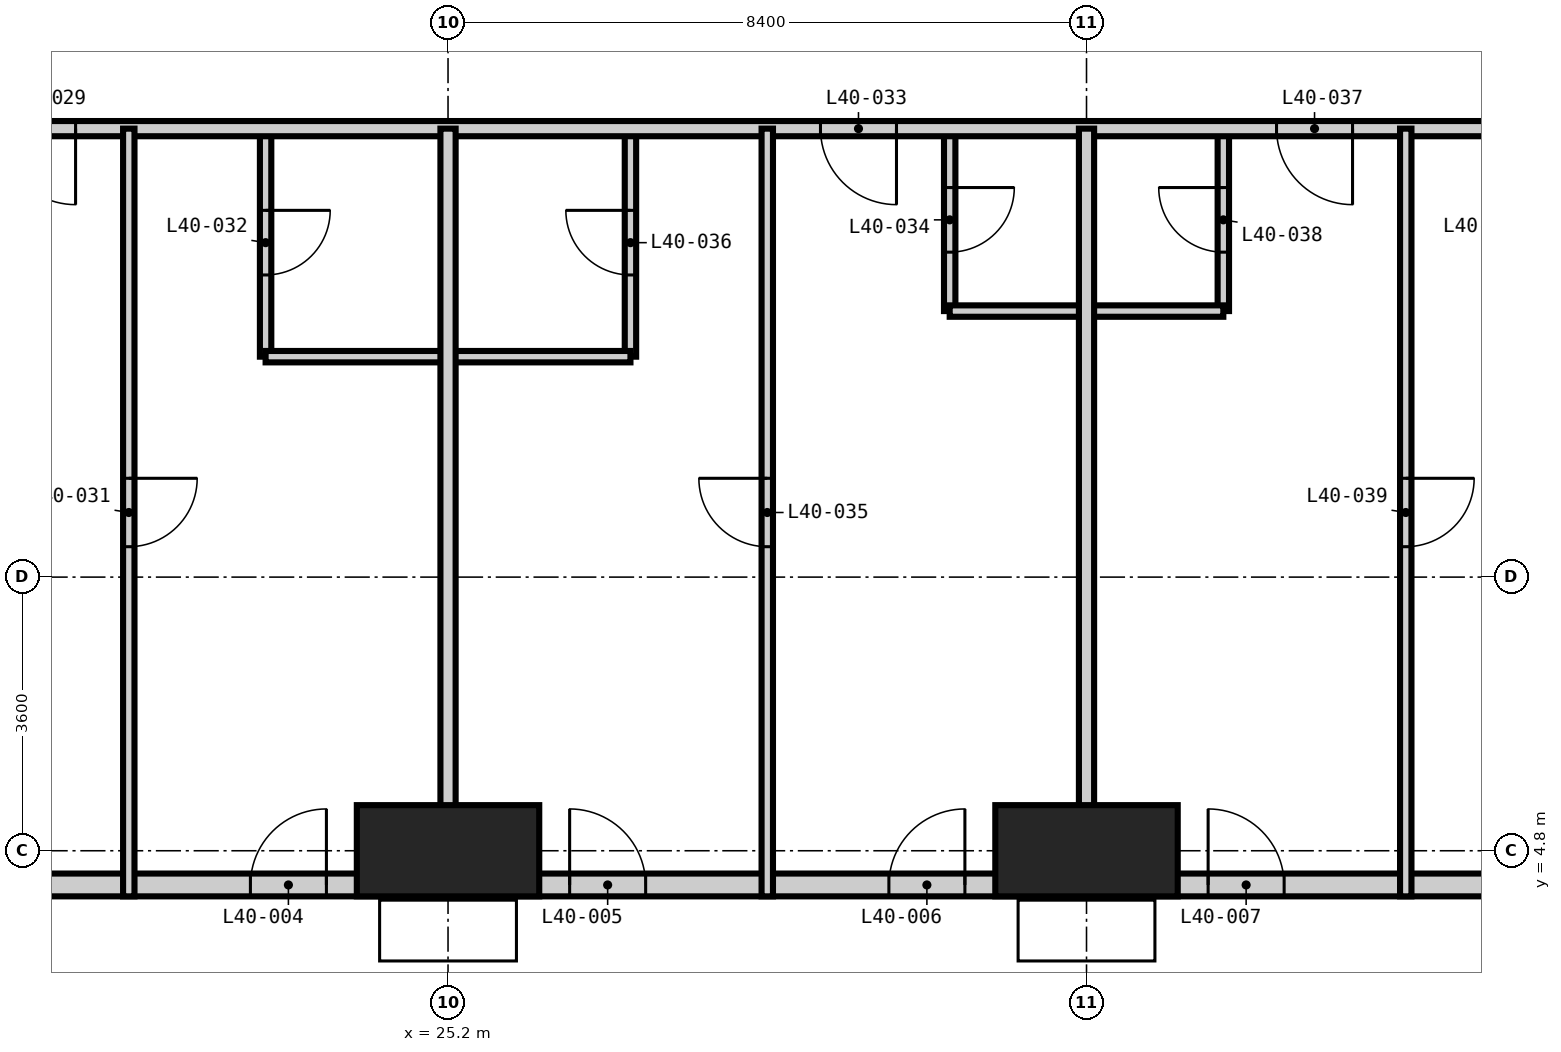
"""IFC4 building model, lengths in metres.
Left out: names, types, materials, properties, quantities, classifications, styles, units other than length and angle.
Written with IfcOpenShell. Run it as: python <this file> out.ifc"""

import sys

from ifc_helpers import new_model, si_unit, direction, frame, frame_2d, origin, origin_2d, place, context, subcontext, project, spatial, rectangle, extrude, element, fill, save


model = new_model("IFC4")
c1 = context("Model", 3, precision=1e-05, world=origin(), true_north=direction((0.0, 1.0)))
c2 = subcontext(c1, "Body", "Model", "MODEL_VIEW")
j1 = project(units=[si_unit("LENGTHUNIT", "METRE"), si_unit("PLANEANGLEUNIT", "RADIAN")], contexts=[c1])
p1 = place(None, origin())
s1 = spatial("IfcSite", under=j1, at=p1, CompositionType="ELEMENT")
p2 = place(p1, origin())
s2 = spatial("IfcBuilding", under=s1, at=p2, CompositionType="ELEMENT")
p3 = place(p2, frame((0.0, 0.0, 159.0)))
s3 = spatial("IfcBuildingStorey", under=s2, at=p3, CompositionType="ELEMENT", Elevation=159.0)
for number, where, z_axis, x_axis in (
    (1, (25.2, 4.8, -0.35), (0.0, 0.0, 1.0), (1.0, 0.0, 0.0)),
    (2, (33.6, 4.8, -0.35), (0.0, 0.0, 1.0), (1.0, 0.0, 0.0)),
):
    element("IfcColumn", number, at=place(p3, frame(where, z_axis=z_axis, x_axis=x_axis)), inside=s3, PredefinedType="COLUMN", context=c2, shape_type="SweptSolid", body=[
        extrude(rectangle(XDim=2.4, YDim=1.2, at=origin_2d()), origin(), (0.0, 0.0, 1.0), 3.6),
    ])
p4 = place(p3, frame((6.9, 4.35, 0.0), z_axis=(0.0, 0.0, 1.0), x_axis=(1.0, 0.0, 0.0)))
e3 = element("IfcWall", 3, at=p4, inside=s3, PredefinedType="SOLIDWALL", context=c2, shape_type="SweptSolid", body=[
    extrude(rectangle(XDim=45.0, YDim=0.3, at=frame_2d((22.5, 0.0))), origin(), (0.0, 0.0, 1.0), 3.25),
])
p5 = place(p4, frame((2.75, 0.0, 0.0)))
e4 = element("IfcOpeningElement", 4, at=p5, cuts=e3, PredefinedType="OPENING", context=c2, shape_type="SweptSolid", body=[
    extrude(rectangle(XDim=1.0, YDim=2.4, at=frame_2d((0.5, 1.2))), frame((0.0, 0.16, 0.0), z_axis=(0.0, -1.0, 0.0), x_axis=(1.0, 0.0, 0.0)), (0.0, 0.0, 1.0), 0.32),
])
p6 = place(p4, frame((7.3, 0.0, 0.0)))
e5 = element("IfcOpeningElement", 5, at=p6, cuts=e3, PredefinedType="OPENING", context=c2, shape_type="SweptSolid", body=[
    extrude(rectangle(XDim=1.0, YDim=2.4, at=frame_2d((0.5, 1.2))), frame((0.0, 0.16, 0.0), z_axis=(0.0, -1.0, 0.0), x_axis=(1.0, 0.0, 0.0)), (0.0, 0.0, 1.0), 0.32),
])
p7 = place(p4, frame((11.5, 0.0, 0.0)))
e6 = element("IfcOpeningElement", 6, at=p7, cuts=e3, PredefinedType="OPENING", context=c2, shape_type="SweptSolid", body=[
    extrude(rectangle(XDim=1.0, YDim=2.4, at=frame_2d((0.5, 1.2))), frame((0.0, 0.16, 0.0), z_axis=(0.0, -1.0, 0.0), x_axis=(1.0, 0.0, 0.0)), (0.0, 0.0, 1.0), 0.32),
])
p8 = place(p4, frame((15.7, 0.0, 0.0)))
e7 = element("IfcOpeningElement", 7, at=p8, cuts=e3, PredefinedType="OPENING", context=c2, shape_type="SweptSolid", body=[
    extrude(rectangle(XDim=1.0, YDim=2.4, at=frame_2d((0.5, 1.2))), frame((0.0, 0.16, 0.0), z_axis=(0.0, -1.0, 0.0), x_axis=(1.0, 0.0, 0.0)), (0.0, 0.0, 1.0), 0.32),
])
p9 = place(p4, frame((19.9, 0.0, 0.0)))
e8 = element("IfcOpeningElement", 8, at=p9, cuts=e3, PredefinedType="OPENING", context=c2, shape_type="SweptSolid", body=[
    extrude(rectangle(XDim=1.0, YDim=2.4, at=frame_2d((0.5, 1.2))), frame((0.0, 0.16, 0.0), z_axis=(0.0, -1.0, 0.0), x_axis=(1.0, 0.0, 0.0)), (0.0, 0.0, 1.0), 0.32),
])
p10 = place(p4, frame((24.1, 0.0, 0.0)))
e9 = element("IfcOpeningElement", 9, at=p10, cuts=e3, PredefinedType="OPENING", context=c2, shape_type="SweptSolid", body=[
    extrude(rectangle(XDim=1.0, YDim=2.4, at=frame_2d((0.5, 1.2))), frame((0.0, 0.16, 0.0), z_axis=(0.0, -1.0, 0.0), x_axis=(1.0, 0.0, 0.0)), (0.0, 0.0, 1.0), 0.32),
])
p11 = place(p4, frame((28.3, 0.0, 0.0)))
e10 = element("IfcOpeningElement", 10, at=p11, cuts=e3, PredefinedType="OPENING", context=c2, shape_type="SweptSolid", body=[
    extrude(rectangle(XDim=1.0, YDim=2.4, at=frame_2d((0.5, 1.2))), frame((0.0, 0.16, 0.0), z_axis=(0.0, -1.0, 0.0), x_axis=(1.0, 0.0, 0.0)), (0.0, 0.0, 1.0), 0.32),
])
p12 = place(p4, frame((32.5, 0.0, 0.0)))
e11 = element("IfcOpeningElement", 11, at=p12, cuts=e3, PredefinedType="OPENING", context=c2, shape_type="SweptSolid", body=[
    extrude(rectangle(XDim=1.0, YDim=2.4, at=frame_2d((0.5, 1.2))), frame((0.0, 0.16, 0.0), z_axis=(0.0, -1.0, 0.0), x_axis=(1.0, 0.0, 0.0)), (0.0, 0.0, 1.0), 0.32),
])
p13 = place(p4, frame((36.7, 0.0, 0.0)))
e12 = element("IfcOpeningElement", 12, at=p13, cuts=e3, PredefinedType="OPENING", context=c2, shape_type="SweptSolid", body=[
    extrude(rectangle(XDim=1.0, YDim=2.4, at=frame_2d((0.5, 1.2))), frame((0.0, 0.16, 0.0), z_axis=(0.0, -1.0, 0.0), x_axis=(1.0, 0.0, 0.0)), (0.0, 0.0, 1.0), 0.32),
])
p14 = place(p4, frame((41.25, 0.0, 0.0)))
e13 = element("IfcOpeningElement", 13, at=p14, cuts=e3, PredefinedType="OPENING", context=c2, shape_type="SweptSolid", body=[
    extrude(rectangle(XDim=1.0, YDim=2.4, at=frame_2d((0.5, 1.2))), frame((0.0, 0.16, 0.0), z_axis=(0.0, -1.0, 0.0), x_axis=(1.0, 0.0, 0.0)), (0.0, 0.0, 1.0), 0.32),
])
p15 = place(p3, frame((22.8, 11.3, 0.0), z_axis=(0.0, 0.0, 1.0), x_axis=(0.0, 1.0, 0.0)))
e14 = element("IfcWall", 14, at=p15, inside=s3, PredefinedType="PARTITIONING", context=c2, shape_type="SweptSolid", body=[
    extrude(rectangle(XDim=3.0, YDim=0.15, at=frame_2d((1.5, 0.0))), origin(), (0.0, 0.0, 1.0), 3.25),
])
p16 = place(p15, frame((1.075, 0.0, 0.0)))
e15 = element("IfcOpeningElement", 15, at=p16, cuts=e14, PredefinedType="OPENING", context=c2, shape_type="SweptSolid", body=[
    extrude(rectangle(XDim=0.85, YDim=2.1, at=frame_2d((0.425, 1.05))), frame((0.0, 0.085, 0.0), z_axis=(0.0, -1.0, 0.0), x_axis=(1.0, 0.0, 0.0)), (0.0, 0.0, 1.0), 0.17),
])
p17 = place(p3, frame((27.6, 11.3, 0.0), z_axis=(0.0, 0.0, 1.0), x_axis=(0.0, 1.0, 0.0)))
e16 = element("IfcWall", 16, at=p17, inside=s3, PredefinedType="PARTITIONING", context=c2, shape_type="SweptSolid", body=[
    extrude(rectangle(XDim=3.0, YDim=0.15, at=frame_2d((1.5, 0.0))), origin(), (0.0, 0.0, 1.0), 3.25),
])
p18 = place(p17, frame((1.075, 0.0, 0.0)))
e17 = element("IfcOpeningElement", 17, at=p18, cuts=e16, PredefinedType="OPENING", context=c2, shape_type="SweptSolid", body=[
    extrude(rectangle(XDim=0.85, YDim=2.1, at=frame_2d((0.425, 1.05))), frame((0.0, 0.085, 0.0), z_axis=(0.0, -1.0, 0.0), x_axis=(1.0, 0.0, 0.0)), (0.0, 0.0, 1.0), 0.17),
])
p19 = place(p3, frame((31.8, 11.9, 0.0), z_axis=(0.0, 0.0, 1.0), x_axis=(0.0, 1.0, 0.0)))
e18 = element("IfcWall", 18, at=p19, inside=s3, PredefinedType="PARTITIONING", context=c2, shape_type="SweptSolid", body=[
    extrude(rectangle(XDim=2.4, YDim=0.15, at=frame_2d((1.2, 0.0))), origin(), (0.0, 0.0, 1.0), 3.25),
])
p20 = place(p19, frame((0.775, 0.0, 0.0)))
e19 = element("IfcOpeningElement", 19, at=p20, cuts=e18, PredefinedType="OPENING", context=c2, shape_type="SweptSolid", body=[
    extrude(rectangle(XDim=0.85, YDim=2.1, at=frame_2d((0.425, 1.05))), frame((0.0, 0.085, 0.0), z_axis=(0.0, -1.0, 0.0), x_axis=(1.0, 0.0, 0.0)), (0.0, 0.0, 1.0), 0.17),
])
p21 = place(p3, frame((35.4, 11.9, 0.0), z_axis=(0.0, 0.0, 1.0), x_axis=(0.0, 1.0, 0.0)))
e20 = element("IfcWall", 20, at=p21, inside=s3, PredefinedType="PARTITIONING", context=c2, shape_type="SweptSolid", body=[
    extrude(rectangle(XDim=2.4, YDim=0.15, at=frame_2d((1.2, 0.0))), origin(), (0.0, 0.0, 1.0), 3.25),
])
p22 = place(p21, frame((0.775, 0.0, 0.0)))
e21 = element("IfcOpeningElement", 21, at=p22, cuts=e20, PredefinedType="OPENING", context=c2, shape_type="SweptSolid", body=[
    extrude(rectangle(XDim=0.85, YDim=2.1, at=frame_2d((0.425, 1.05))), frame((0.0, 0.085, 0.0), z_axis=(0.0, -1.0, 0.0), x_axis=(1.0, 0.0, 0.0)), (0.0, 0.0, 1.0), 0.17),
])
p23 = place(p3, frame((22.8, 11.3, 0.0), z_axis=(0.0, 0.0, 1.0), x_axis=(1.0, 0.0, 0.0)))
e22 = element("IfcWall", 22, at=p23, inside=s3, PredefinedType="PARTITIONING", context=c2, shape_type="SweptSolid", body=[
    extrude(rectangle(XDim=4.8, YDim=0.15, at=frame_2d((2.4, 0.0))), origin(), (0.0, 0.0, 1.0), 3.25),
])
p24 = place(p3, frame((31.8, 11.9, 0.0), z_axis=(0.0, 0.0, 1.0), x_axis=(1.0, 0.0, 0.0)))
e23 = element("IfcWall", 23, at=p24, inside=s3, PredefinedType="PARTITIONING", context=c2, shape_type="SweptSolid", body=[
    extrude(rectangle(XDim=3.6, YDim=0.15, at=frame_2d((1.8, 0.0))), origin(), (0.0, 0.0, 1.0), 3.25),
])
p25 = place(p3, frame((45.1, 14.3, 0.0), z_axis=(0.0, 0.0, 1.0), x_axis=(-1.0, 0.0, 0.0)))
e24 = element("IfcWall", 24, at=p25, inside=s3, PredefinedType="PARTITIONING", context=c2, shape_type="SweptSolid", body=[
    extrude(rectangle(XDim=30.8, YDim=0.2, at=frame_2d((15.4, 0.0))), origin(), (0.0, 0.0, 1.0), 3.25),
])
p26 = place(p25, frame((24.8, 0.0, 0.0)))
e25 = element("IfcOpeningElement", 25, at=p26, cuts=e24, PredefinedType="OPENING", context=c2, shape_type="SweptSolid", body=[
    extrude(rectangle(XDim=1.0, YDim=2.2, at=frame_2d((0.5, 1.1))), frame((0.0, 0.11, 0.0), z_axis=(0.0, -1.0, 0.0), x_axis=(1.0, 0.0, 0.0)), (0.0, 0.0, 1.0), 0.22),
])
p27 = place(p25, frame((14.0, 0.0, 0.0)))
e26 = element("IfcOpeningElement", 26, at=p27, cuts=e24, PredefinedType="OPENING", context=c2, shape_type="SweptSolid", body=[
    extrude(rectangle(XDim=1.0, YDim=2.2, at=frame_2d((0.5, 1.1))), frame((0.0, 0.11, 0.0), z_axis=(0.0, -1.0, 0.0), x_axis=(1.0, 0.0, 0.0)), (0.0, 0.0, 1.0), 0.22),
])
p28 = place(p25, frame((8.0, 0.0, 0.0)))
e27 = element("IfcOpeningElement", 27, at=p28, cuts=e24, PredefinedType="OPENING", context=c2, shape_type="SweptSolid", body=[
    extrude(rectangle(XDim=1.0, YDim=2.2, at=frame_2d((0.5, 1.1))), frame((0.0, 0.11, 0.0), z_axis=(0.0, -1.0, 0.0), x_axis=(1.0, 0.0, 0.0)), (0.0, 0.0, 1.0), 0.22),
])
for number, where, z_axis, x_axis in (
    (28, (25.2, 4.2, 0.0), (0.0, 0.0, 1.0), (0.0, 1.0, 0.0)),
    (29, (33.6, 4.2, 0.0), (0.0, 0.0, 1.0), (0.0, 1.0, 0.0)),
):
    element("IfcWall", number, at=place(p3, frame(where, z_axis=z_axis, x_axis=x_axis)), inside=s3, PredefinedType="PARTITIONING", context=c2, shape_type="SweptSolid", body=[
        extrude(rectangle(XDim=10.1, YDim=0.2, at=frame_2d((5.05, 0.0))), origin(), (0.0, 0.0, 1.0), 3.25),
    ])
p29 = place(p3, frame((21.0, 4.2, 0.0), z_axis=(0.0, 0.0, 1.0), x_axis=(0.0, 1.0, 0.0)))
e30 = element("IfcWall", 30, at=p29, inside=s3, PredefinedType="PARTITIONING", context=c2, shape_type="SweptSolid", body=[
    extrude(rectangle(XDim=10.1, YDim=0.15, at=frame_2d((5.05, 0.0))), origin(), (0.0, 0.0, 1.0), 3.25),
])
p30 = place(p29, frame((4.6, 0.0, 0.0)))
e31 = element("IfcOpeningElement", 31, at=p30, cuts=e30, PredefinedType="OPENING", context=c2, shape_type="SweptSolid", body=[
    extrude(rectangle(XDim=0.9, YDim=2.1, at=frame_2d((0.45, 1.05))), frame((0.0, 0.085, 0.0), z_axis=(0.0, -1.0, 0.0), x_axis=(1.0, 0.0, 0.0)), (0.0, 0.0, 1.0), 0.17),
])
p31 = place(p3, frame((29.4, 4.2, 0.0), z_axis=(0.0, 0.0, 1.0), x_axis=(0.0, 1.0, 0.0)))
e32 = element("IfcWall", 32, at=p31, inside=s3, PredefinedType="PARTITIONING", context=c2, shape_type="SweptSolid", body=[
    extrude(rectangle(XDim=10.1, YDim=0.15, at=frame_2d((5.05, 0.0))), origin(), (0.0, 0.0, 1.0), 3.25),
])
p32 = place(p31, frame((4.6, 0.0, 0.0)))
e33 = element("IfcOpeningElement", 33, at=p32, cuts=e32, PredefinedType="OPENING", context=c2, shape_type="SweptSolid", body=[
    extrude(rectangle(XDim=0.9, YDim=2.1, at=frame_2d((0.45, 1.05))), frame((0.0, 0.085, 0.0), z_axis=(0.0, -1.0, 0.0), x_axis=(1.0, 0.0, 0.0)), (0.0, 0.0, 1.0), 0.17),
])
p33 = place(p3, frame((37.8, 4.2, 0.0), z_axis=(0.0, 0.0, 1.0), x_axis=(0.0, 1.0, 0.0)))
e34 = element("IfcWall", 34, at=p33, inside=s3, PredefinedType="PARTITIONING", context=c2, shape_type="SweptSolid", body=[
    extrude(rectangle(XDim=10.1, YDim=0.15, at=frame_2d((5.05, 0.0))), origin(), (0.0, 0.0, 1.0), 3.25),
])
p34 = place(p33, frame((4.6, 0.0, 0.0)))
e35 = element("IfcOpeningElement", 35, at=p34, cuts=e34, PredefinedType="OPENING", context=c2, shape_type="SweptSolid", body=[
    extrude(rectangle(XDim=0.9, YDim=2.1, at=frame_2d((0.45, 1.05))), frame((0.0, 0.085, 0.0), z_axis=(0.0, -1.0, 0.0), x_axis=(1.0, 0.0, 0.0)), (0.0, 0.0, 1.0), 0.17),
])
p35 = place(p8, origin())
e36 = element("IfcDoor", 36, at=p35, inside=s3, OperationType="SINGLE_SWING_RIGHT", PredefinedType="DOOR", context=c2, shape_type="SweptSolid", body=[
    extrude(rectangle(XDim=1.0, YDim=2.4, at=frame_2d((0.5, 1.2))), frame((0.0, 0.025, 0.0), z_axis=(0.0, -1.0, 0.0), x_axis=(1.0, 0.0, 0.0)), (0.0, 0.0, 1.0), 0.05),
])
fill(e7, e36)
p36 = place(p9, origin())
e37 = element("IfcDoor", 37, at=p36, inside=s3, OperationType="SINGLE_SWING_LEFT", PredefinedType="DOOR", context=c2, shape_type="SweptSolid", body=[
    extrude(rectangle(XDim=1.0, YDim=2.4, at=frame_2d((0.5, 1.2))), frame((0.0, 0.025, 0.0), z_axis=(0.0, -1.0, 0.0), x_axis=(1.0, 0.0, 0.0)), (0.0, 0.0, 1.0), 0.05),
])
fill(e8, e37)
p37 = place(p10, origin())
e38 = element("IfcDoor", 38, at=p37, inside=s3, OperationType="SINGLE_SWING_RIGHT", PredefinedType="DOOR", context=c2, shape_type="SweptSolid", body=[
    extrude(rectangle(XDim=1.0, YDim=2.4, at=frame_2d((0.5, 1.2))), frame((0.0, 0.025, 0.0), z_axis=(0.0, -1.0, 0.0), x_axis=(1.0, 0.0, 0.0)), (0.0, 0.0, 1.0), 0.05),
])
fill(e9, e38)
p38 = place(p11, origin())
e39 = element("IfcDoor", 39, at=p38, inside=s3, OperationType="SINGLE_SWING_LEFT", PredefinedType="DOOR", context=c2, shape_type="SweptSolid", body=[
    extrude(rectangle(XDim=1.0, YDim=2.4, at=frame_2d((0.5, 1.2))), frame((0.0, 0.025, 0.0), z_axis=(0.0, -1.0, 0.0), x_axis=(1.0, 0.0, 0.0)), (0.0, 0.0, 1.0), 0.05),
])
fill(e10, e39)
p39 = place(p26, origin())
e40 = element("IfcDoor", 40, at=p39, inside=s3, OperationType="SINGLE_SWING_LEFT", PredefinedType="DOOR", context=c2, shape_type="SweptSolid", body=[
    extrude(rectangle(XDim=1.0, YDim=2.2, at=frame_2d((0.5, 1.1))), frame((0.0, 0.025, 0.0), z_axis=(0.0, -1.0, 0.0), x_axis=(1.0, 0.0, 0.0)), (0.0, 0.0, 1.0), 0.05),
])
fill(e25, e40)
p40 = place(p30, frame((0.9, 0.0, 0.0), z_axis=(0.0, 0.0, 1.0), x_axis=(-1.0, 0.0, 0.0)))
e41 = element("IfcDoor", 41, at=p40, inside=s3, OperationType="SINGLE_SWING_LEFT", PredefinedType="DOOR", context=c2, shape_type="SweptSolid", body=[
    extrude(rectangle(XDim=0.9, YDim=2.1, at=frame_2d((0.45, 1.05))), frame((0.0, 0.025, 0.0), z_axis=(0.0, -1.0, 0.0), x_axis=(1.0, 0.0, 0.0)), (0.0, 0.0, 1.0), 0.05),
])
fill(e31, e41)
p41 = place(p16, frame((0.85, 0.0, 0.0), z_axis=(0.0, 0.0, 1.0), x_axis=(-1.0, 0.0, 0.0)))
e42 = element("IfcDoor", 42, at=p41, inside=s3, OperationType="SINGLE_SWING_LEFT", PredefinedType="DOOR", context=c2, shape_type="SweptSolid", body=[
    extrude(rectangle(XDim=0.85, YDim=2.1, at=frame_2d((0.425, 1.05))), frame((0.0, 0.025, 0.0), z_axis=(0.0, -1.0, 0.0), x_axis=(1.0, 0.0, 0.0)), (0.0, 0.0, 1.0), 0.05),
])
fill(e15, e42)
p42 = place(p27, origin())
e43 = element("IfcDoor", 43, at=p42, inside=s3, OperationType="SINGLE_SWING_LEFT", PredefinedType="DOOR", context=c2, shape_type="SweptSolid", body=[
    extrude(rectangle(XDim=1.0, YDim=2.2, at=frame_2d((0.5, 1.1))), frame((0.0, 0.025, 0.0), z_axis=(0.0, -1.0, 0.0), x_axis=(1.0, 0.0, 0.0)), (0.0, 0.0, 1.0), 0.05),
])
fill(e26, e43)
p43 = place(p20, frame((0.85, 0.0, 0.0), z_axis=(0.0, 0.0, 1.0), x_axis=(-1.0, 0.0, 0.0)))
e44 = element("IfcDoor", 44, at=p43, inside=s3, OperationType="SINGLE_SWING_LEFT", PredefinedType="DOOR", context=c2, shape_type="SweptSolid", body=[
    extrude(rectangle(XDim=0.85, YDim=2.1, at=frame_2d((0.425, 1.05))), frame((0.0, 0.025, 0.0), z_axis=(0.0, -1.0, 0.0), x_axis=(1.0, 0.0, 0.0)), (0.0, 0.0, 1.0), 0.05),
])
fill(e19, e44)
p44 = place(p32, origin())
e45 = element("IfcDoor", 45, at=p44, inside=s3, OperationType="SINGLE_SWING_RIGHT", PredefinedType="DOOR", context=c2, shape_type="SweptSolid", body=[
    extrude(rectangle(XDim=0.9, YDim=2.1, at=frame_2d((0.45, 1.05))), frame((0.0, 0.025, 0.0), z_axis=(0.0, -1.0, 0.0), x_axis=(1.0, 0.0, 0.0)), (0.0, 0.0, 1.0), 0.05),
])
fill(e33, e45)
p45 = place(p18, origin())
e46 = element("IfcDoor", 46, at=p45, inside=s3, OperationType="SINGLE_SWING_RIGHT", PredefinedType="DOOR", context=c2, shape_type="SweptSolid", body=[
    extrude(rectangle(XDim=0.85, YDim=2.1, at=frame_2d((0.425, 1.05))), frame((0.0, 0.025, 0.0), z_axis=(0.0, -1.0, 0.0), x_axis=(1.0, 0.0, 0.0)), (0.0, 0.0, 1.0), 0.05),
])
fill(e17, e46)
p46 = place(p28, origin())
e47 = element("IfcDoor", 47, at=p46, inside=s3, OperationType="SINGLE_SWING_LEFT", PredefinedType="DOOR", context=c2, shape_type="SweptSolid", body=[
    extrude(rectangle(XDim=1.0, YDim=2.2, at=frame_2d((0.5, 1.1))), frame((0.0, 0.025, 0.0), z_axis=(0.0, -1.0, 0.0), x_axis=(1.0, 0.0, 0.0)), (0.0, 0.0, 1.0), 0.05),
])
fill(e27, e47)
p47 = place(p22, origin())
e48 = element("IfcDoor", 48, at=p47, inside=s3, OperationType="SINGLE_SWING_RIGHT", PredefinedType="DOOR", context=c2, shape_type="SweptSolid", body=[
    extrude(rectangle(XDim=0.85, YDim=2.1, at=frame_2d((0.425, 1.05))), frame((0.0, 0.025, 0.0), z_axis=(0.0, -1.0, 0.0), x_axis=(1.0, 0.0, 0.0)), (0.0, 0.0, 1.0), 0.05),
])
fill(e21, e48)
p48 = place(p34, frame((0.9, 0.0, 0.0), z_axis=(0.0, 0.0, 1.0), x_axis=(-1.0, 0.0, 0.0)))
e49 = element("IfcDoor", 49, at=p48, inside=s3, OperationType="SINGLE_SWING_LEFT", PredefinedType="DOOR", context=c2, shape_type="SweptSolid", body=[
    extrude(rectangle(XDim=0.9, YDim=2.1, at=frame_2d((0.45, 1.05))), frame((0.0, 0.025, 0.0), z_axis=(0.0, -1.0, 0.0), x_axis=(1.0, 0.0, 0.0)), (0.0, 0.0, 1.0), 0.05),
])
fill(e35, e49)
save(model, sys.argv[1])
